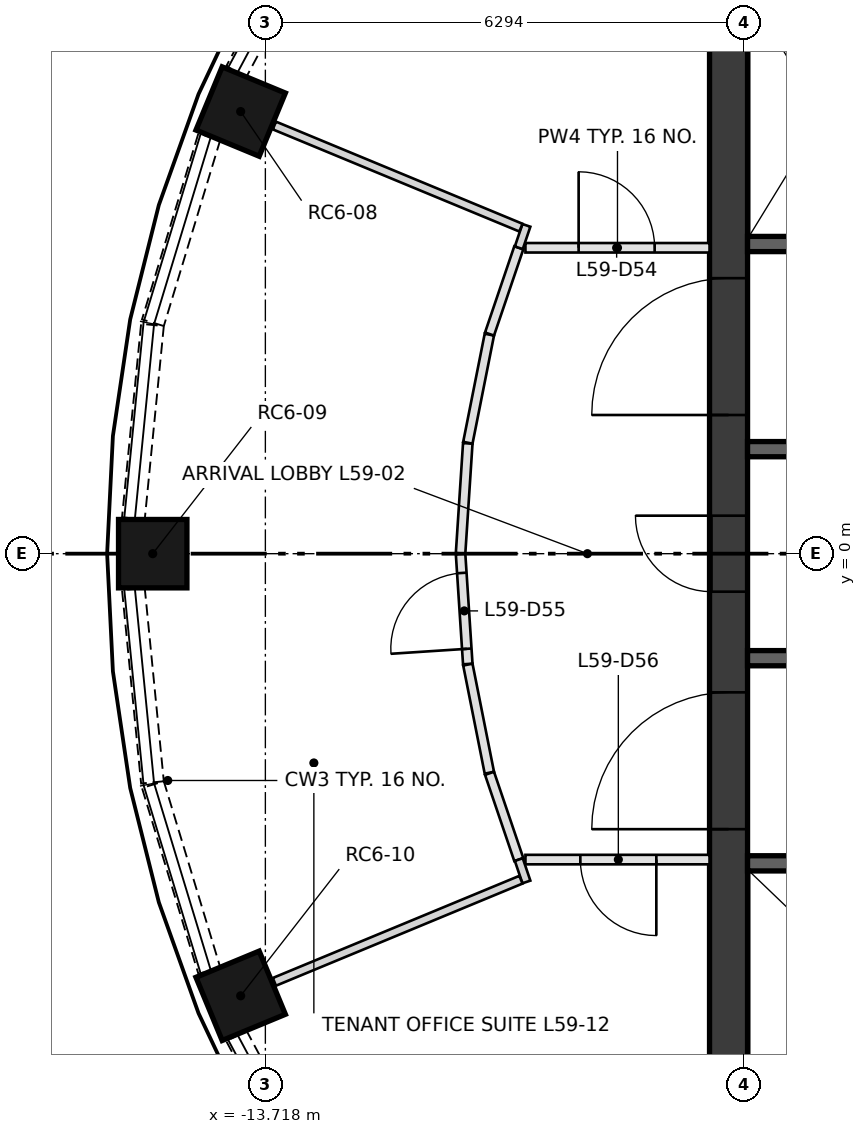
"""IFC4 building model, lengths in metres.
Left out: names, types, materials, properties, quantities, classifications, styles, units other than length and angle.
Written with IfcOpenShell. Run it as: python <this file> out.ifc"""

import sys

from ifc_helpers import new_model, si_unit, direction, frame, frame_2d, origin, origin_2d, place, context, subcontext, project, spatial, rectangle, extrude, element, fill, save


model = new_model("IFC4")
c1 = context("Model", 3, precision=1e-05, world=origin(), true_north=direction((0.0, 1.0)))
c2 = subcontext(c1, "Body", "Model", "MODEL_VIEW")
j1 = project(units=[si_unit("LENGTHUNIT", "METRE"), si_unit("PLANEANGLEUNIT", "RADIAN")], contexts=[c1])
p1 = place(None, origin())
s1 = spatial("IfcSite", under=j1, at=p1, CompositionType="ELEMENT")
p2 = place(p1, origin())
s2 = spatial("IfcBuilding", under=s1, at=p2, CompositionType="ELEMENT")
p3 = place(p2, frame((0.0, 0.0, 217.8)))
s3 = spatial("IfcBuildingStorey", under=s2, at=p3, CompositionType="ELEMENT", Elevation=217.8)
for number, where, z_axis, x_axis in (
    (1, (-14.043, 5.817, 0.5), (0.0, 0.0, 1.0), (-0.924, 0.383, 0.0)),
    (2, (-15.2, 0.0, 0.5), (0.0, 0.0, 1.0), (-1.0, 0.0, 0.0)),
    (3, (-14.043, -5.817, 0.5), (0.0, 0.0, 1.0), (-0.924, -0.383, 0.0)),
):
    element("IfcColumn", number, at=place(p3, frame(where, z_axis=z_axis, x_axis=x_axis)), inside=s3, PredefinedType="COLUMN", context=c2, shape_type="SweptSolid", body=[
        extrude(rectangle(XDim=0.9, YDim=0.9, at=origin_2d()), origin(), (0.0, 0.0, 1.0), 2.85),
    ])
p4 = place(p3, frame((-7.624, -7.374, 0.0), z_axis=(0.0, 0.0, 1.0), x_axis=(0.0, 1.0, 0.0)))
e4 = element("IfcWall", 4, at=p4, inside=s3, PredefinedType="SHEAR", context=c2, shape_type="SweptSolid", body=[
    extrude(rectangle(XDim=14.748, YDim=0.5, at=frame_2d((7.374, 0.0))), origin(), (0.0, 0.0, 1.0), 3.35),
])
p5 = place(p4, frame((6.874, 0.0, 0.0)))
e5 = element("IfcOpeningElement", 5, at=p5, cuts=e4, PredefinedType="OPENING", context=c2, shape_type="SweptSolid", body=[
    extrude(rectangle(XDim=1.0, YDim=2.1, at=frame_2d((0.5, 1.05))), frame((0.0, 0.26, 0.0), z_axis=(0.0, -1.0, 0.0), x_axis=(1.0, 0.0, 0.0)), (0.0, 0.0, 1.0), 0.52),
])
p6 = place(p4, frame((3.75, 0.0, 0.0)))
e6 = element("IfcOpeningElement", 6, at=p6, cuts=e4, PredefinedType="OPENING", context=c2, shape_type="SweptSolid", body=[
    extrude(rectangle(XDim=1.8, YDim=2.1, at=frame_2d((0.9, 1.05))), frame((0.0, 0.26, 0.0), z_axis=(0.0, -1.0, 0.0), x_axis=(1.0, 0.0, 0.0)), (0.0, 0.0, 1.0), 0.52),
])
p7 = place(p4, frame((9.198, 0.0, 0.0)))
e7 = element("IfcOpeningElement", 7, at=p7, cuts=e4, PredefinedType="OPENING", context=c2, shape_type="SweptSolid", body=[
    extrude(rectangle(XDim=1.8, YDim=2.1, at=frame_2d((0.9, 1.05))), frame((0.0, 0.26, 0.0), z_axis=(0.0, -1.0, 0.0), x_axis=(1.0, 0.0, 0.0)), (0.0, 0.0, 1.0), 0.52),
])
p8 = place(p3, frame((-7.374, -4.074, 0.0), z_axis=(0.0, 0.0, 1.0), x_axis=(1.0, 0.0, 0.0)))
e8 = element("IfcWall", 8, at=p8, inside=s3, PredefinedType="SHEAR", context=c2, shape_type="SweptSolid", body=[
    extrude(rectangle(XDim=14.748, YDim=0.2, at=frame_2d((7.374, 0.0))), origin(), (0.0, 0.0, 1.0), 3.0),
])
p9 = place(p8, frame((1.319, 0.0, 0.0)))
e9 = element("IfcOpeningElement", 9, at=p9, cuts=e8, PredefinedType="OPENING", context=c2, shape_type="SweptSolid", body=[
    extrude(rectangle(XDim=1.1, YDim=2.1, at=frame_2d((0.55, 1.05))), frame((0.0, 0.11, 0.0), z_axis=(0.0, -1.0, 0.0), x_axis=(1.0, 0.0, 0.0)), (0.0, 0.0, 1.0), 0.22),
])
p10 = place(p8, frame((4.456, 0.0, 0.0)))
e10 = element("IfcOpeningElement", 10, at=p10, cuts=e8, PredefinedType="OPENING", context=c2, shape_type="SweptSolid", body=[
    extrude(rectangle(XDim=1.1, YDim=2.1, at=frame_2d((0.55, 1.05))), frame((0.0, 0.11, 0.0), z_axis=(0.0, -1.0, 0.0), x_axis=(1.0, 0.0, 0.0)), (0.0, 0.0, 1.0), 0.22),
])
p11 = place(p8, frame((8.143, 0.0, 0.0)))
e11 = element("IfcOpeningElement", 11, at=p11, cuts=e8, PredefinedType="OPENING", context=c2, shape_type="SweptSolid", body=[
    extrude(rectangle(XDim=1.0, YDim=2.1, at=frame_2d((0.5, 1.05))), frame((0.0, 0.11, 0.0), z_axis=(0.0, -1.0, 0.0), x_axis=(1.0, 0.0, 0.0)), (0.0, 0.0, 1.0), 0.22),
])
p12 = place(p8, frame((12.379, 0.0, 0.0)))
e12 = element("IfcOpeningElement", 12, at=p12, cuts=e8, PredefinedType="OPENING", context=c2, shape_type="SweptSolid", body=[
    extrude(rectangle(XDim=0.8, YDim=2.1, at=frame_2d((0.4, 1.05))), frame((0.0, 0.11, 0.0), z_axis=(0.0, -1.0, 0.0), x_axis=(1.0, 0.0, 0.0)), (0.0, 0.0, 1.0), 0.22),
])
p13 = place(p3, frame((-7.374, 4.074, 0.0), z_axis=(0.0, 0.0, 1.0), x_axis=(1.0, 0.0, 0.0)))
e13 = element("IfcWall", 13, at=p13, inside=s3, PredefinedType="SHEAR", context=c2, shape_type="SweptSolid", body=[
    extrude(rectangle(XDim=7.374, YDim=0.2, at=frame_2d((3.687, 0.0))), origin(), (0.0, 0.0, 1.0), 3.0),
])
p14 = place(p13, frame((0.684, 0.0, 0.0)))
e14 = element("IfcOpeningElement", 14, at=p14, cuts=e13, PredefinedType="OPENING", context=c2, shape_type="SweptSolid", body=[
    extrude(rectangle(XDim=1.0, YDim=2.1, at=frame_2d((0.5, 1.05))), frame((0.0, 0.11, 0.0), z_axis=(0.0, -1.0, 0.0), x_axis=(1.0, 0.0, 0.0)), (0.0, 0.0, 1.0), 0.22),
])
p15 = place(p13, frame((2.453, 0.0, 0.0)))
e15 = element("IfcOpeningElement", 15, at=p15, cuts=e13, PredefinedType="OPENING", context=c2, shape_type="SweptSolid", body=[
    extrude(rectangle(XDim=1.0, YDim=2.1, at=frame_2d((0.5, 1.05))), frame((0.0, 0.11, 0.0), z_axis=(0.0, -1.0, 0.0), x_axis=(1.0, 0.0, 0.0)), (0.0, 0.0, 1.0), 0.22),
])
p16 = place(p13, frame((4.221, 0.0, 0.0)))
e16 = element("IfcOpeningElement", 16, at=p16, cuts=e13, PredefinedType="OPENING", context=c2, shape_type="SweptSolid", body=[
    extrude(rectangle(XDim=1.0, YDim=2.1, at=frame_2d((0.5, 1.05))), frame((0.0, 0.11, 0.0), z_axis=(0.0, -1.0, 0.0), x_axis=(1.0, 0.0, 0.0)), (0.0, 0.0, 1.0), 0.22),
])
p17 = place(p13, frame((5.99, 0.0, 0.0)))
e17 = element("IfcOpeningElement", 17, at=p17, cuts=e13, PredefinedType="OPENING", context=c2, shape_type="SweptSolid", body=[
    extrude(rectangle(XDim=1.0, YDim=2.1, at=frame_2d((0.5, 1.05))), frame((0.0, 0.11, 0.0), z_axis=(0.0, -1.0, 0.0), x_axis=(1.0, 0.0, 0.0)), (0.0, 0.0, 1.0), 0.22),
])
for number, where, z_axis, x_axis in (
    (18, (-7.374, -1.375, 0.0), (0.0, 0.0, 1.0), (1.0, 0.0, 0.0)),
    (19, (-7.374, 1.375, 0.0), (0.0, 0.0, 1.0), (1.0, 0.0, 0.0)),
):
    element("IfcWall", number, at=place(p3, frame(where, z_axis=z_axis, x_axis=x_axis)), inside=s3, PredefinedType="SHEAR", context=c2, shape_type="SweptSolid", body=[
        extrude(rectangle(XDim=3.0, YDim=0.2, at=frame_2d((1.5, 0.0))), origin(), (0.0, 0.0, 1.0), 3.0),
    ])
p18 = place(p3, frame((-12.894, 8.598, 0.0), z_axis=(0.0, 0.0, 1.0), x_axis=(-0.471603904468, -0.881810499649, 0.0)))
e20 = element("IfcWall", 20, at=p18, inside=s3, PredefinedType="SOLIDWALL", context=c2, shape_type="SweptSolid", body=[
    extrude(rectangle(XDim=2.557, YDim=0.3, at=frame_2d((1.278, 0.0))), origin(), (0.0, 0.0, 1.0), 0.9),
])
p19 = place(p3, frame((-14.455, 5.486, 0.0), z_axis=(0.0, 0.0, 1.0), x_axis=(-0.290219358397, -0.956960147557, 0.0)))
e21 = element("IfcWall", 21, at=p19, inside=s3, PredefinedType="SOLIDWALL", context=c2, shape_type="SweptSolid", body=[
    extrude(rectangle(XDim=2.557, YDim=0.3, at=frame_2d((1.279, 0.0))), origin(), (0.0, 0.0, 1.0), 0.9),
])
for number, where, z_axis, x_axis in (
    (22, (-15.204, 3.009, 0.0), (0.0, 0.0, 1.0), (-0.098, -0.995, 0.0)),
    (23, (-15.455, -0.464, 0.0), (0.0, 0.0, 1.0), (0.098, -0.995, 0.0)),
):
    element("IfcWall", number, at=place(p3, frame(where, z_axis=z_axis, x_axis=x_axis)), inside=s3, PredefinedType="SOLIDWALL", context=c2, shape_type="SweptSolid", body=[
        extrude(rectangle(XDim=2.558, YDim=0.3, at=frame_2d((1.279, 0.0))), origin(), (0.0, 0.0, 1.0), 0.9),
    ])
p20 = place(p3, frame((-15.198, -3.038, 0.0), z_axis=(0.0, 0.0, 1.0), x_axis=(0.290219358397, -0.956960147557, 0.0)))
e24 = element("IfcWall", 24, at=p20, inside=s3, PredefinedType="SOLIDWALL", context=c2, shape_type="SweptSolid", body=[
    extrude(rectangle(XDim=2.557, YDim=0.3, at=frame_2d((1.279, 0.0))), origin(), (0.0, 0.0, 1.0), 0.9),
])
p21 = place(p3, frame((-14.1, -6.343, 0.0), z_axis=(0.0, 0.0, 1.0), x_axis=(0.471603904468, -0.881810499649, 0.0)))
e25 = element("IfcWall", 25, at=p21, inside=s3, PredefinedType="SOLIDWALL", context=c2, shape_type="SweptSolid", body=[
    extrude(rectangle(XDim=2.557, YDim=0.3, at=frame_2d((1.278, 0.0))), origin(), (0.0, 0.0, 1.0), 0.9),
])
p22 = place(p3, frame((-10.296, 4.024, 0.0), z_axis=(0.0, 0.0, 1.0), x_axis=(1.0, 0.0, 0.0)))
e26 = element("IfcWall", 26, at=p22, inside=s3, PredefinedType="PARTITIONING", context=c2, shape_type="SweptSolid", body=[
    extrude(rectangle(XDim=2.422, YDim=0.125, at=frame_2d((1.211, 0.0))), origin(), (0.0, 0.0, 1.0), 3.0),
])
p23 = place(p22, frame((0.7, 0.0, 0.0)))
e27 = element("IfcOpeningElement", 27, at=p23, cuts=e26, PredefinedType="OPENING", context=c2, shape_type="SweptSolid", body=[
    extrude(rectangle(XDim=1.0, YDim=2.1, at=frame_2d((0.5, 1.05))), frame((0.0, 0.073, 0.0), z_axis=(0.0, -1.0, 0.0), x_axis=(1.0, 0.0, 0.0)), (0.0, 0.0, 1.0), 0.145),
])
p24 = place(p3, frame((-11.15, 0.004, 0.0), z_axis=(0.0, 0.0, 1.0), x_axis=(0.065312343013, 0.997864869534, 0.0)))
e28 = element("IfcWall", 28, at=p24, inside=s3, PredefinedType="PARTITIONING", context=c2, shape_type="SweptSolid", body=[
    extrude(rectangle(XDim=1.45, YDim=0.125, at=frame_2d((0.725, 0.0))), origin(), (0.0, 0.0, 1.0), 3.0),
])
p25 = place(p3, frame((-11.055, -1.451, 0.0), z_axis=(0.0, 0.0, 1.0), x_axis=(-0.065312343013, 0.997864869534, 0.0)))
e29 = element("IfcWall", 29, at=p25, inside=s3, PredefinedType="PARTITIONING", context=c2, shape_type="SweptSolid", body=[
    extrude(rectangle(XDim=1.45, YDim=0.125, at=frame_2d((0.725, 0.0))), origin(), (0.0, 0.0, 1.0), 3.0),
])
p26 = place(p25, frame((0.2, 0.0, 0.0)))
e30 = element("IfcOpeningElement", 30, at=p26, cuts=e29, PredefinedType="OPENING", context=c2, shape_type="SweptSolid", body=[
    extrude(rectangle(XDim=1.0, YDim=2.1, at=frame_2d((0.5, 1.05))), frame((0.0, 0.073, 0.0), z_axis=(0.0, -1.0, 0.0), x_axis=(1.0, 0.0, 0.0)), (0.0, 0.0, 1.0), 0.145),
])
for number, where, z_axis, x_axis in (
    (31, (-11.054, 1.459, 0.0), (0.0, 0.0, 1.0), (0.195, 0.981, 0.0)),
    (32, (-10.771, -2.882, 0.0), (0.0, 0.0, 1.0), (-0.195, 0.981, 0.0)),
):
    element("IfcWall", number, at=place(p3, frame(where, z_axis=z_axis, x_axis=x_axis)), inside=s3, PredefinedType="PARTITIONING", context=c2, shape_type="SweptSolid", body=[
        extrude(rectangle(XDim=1.45, YDim=0.125, at=frame_2d((0.725, 0.0))), origin(), (0.0, 0.0, 1.0), 3.0),
    ])
for number, where, z_axis, x_axis in (
    (33, (-10.769, 2.89, 0.0), (0.0, 0.0, 1.0), (0.321, 0.947, 0.0)),
    (34, (-10.384, -4.024, 0.0), (0.0, 0.0, 1.0), (-0.321, 0.947, 0.0)),
):
    element("IfcWall", number, at=place(p3, frame(where, z_axis=z_axis, x_axis=x_axis)), inside=s3, PredefinedType="PARTITIONING", context=c2, shape_type="SweptSolid", body=[
        extrude(rectangle(XDim=1.198, YDim=0.125, at=frame_2d((0.599, 0.0))), origin(), (0.0, 0.0, 1.0), 3.0),
    ])
p27 = place(p3, frame((-7.874, -4.024, 0.0), z_axis=(0.0, 0.0, 1.0), x_axis=(-1.0, 0.0, 0.0)))
e35 = element("IfcWall", 35, at=p27, inside=s3, PredefinedType="PARTITIONING", context=c2, shape_type="SweptSolid", body=[
    extrude(rectangle(XDim=2.422, YDim=0.125, at=frame_2d((1.211, 0.0))), origin(), (0.0, 0.0, 1.0), 3.0),
])
p28 = place(p27, frame((0.7, 0.0, 0.0)))
e36 = element("IfcOpeningElement", 36, at=p28, cuts=e35, PredefinedType="OPENING", context=c2, shape_type="SweptSolid", body=[
    extrude(rectangle(XDim=1.0, YDim=2.1, at=frame_2d((0.5, 1.05))), frame((0.0, 0.073, 0.0), z_axis=(0.0, -1.0, 0.0), x_axis=(1.0, 0.0, 0.0)), (0.0, 0.0, 1.0), 0.145),
])
p29 = place(p3, frame((-10.384, 4.024, 0.0), z_axis=(0.0, 0.0, 1.0), x_axis=(0.320931919594, 0.947102266382, 0.0)))
e37 = element("IfcWall", 37, at=p29, inside=s3, PredefinedType="PARTITIONING", context=c2, shape_type="SweptSolid", body=[
    extrude(rectangle(XDim=0.311, YDim=0.11, at=frame_2d((0.156, 0.0))), origin(), (0.0, 0.0, 1.0), 3.0),
])
p30 = place(p3, frame((-10.356, 4.289, 0.0), z_axis=(0.0, 0.0, 1.0), x_axis=(-0.923871065891, 0.382703871955, 0.0)))
e38 = element("IfcWall", 38, at=p30, inside=s3, PredefinedType="PARTITIONING", context=c2, shape_type="SweptSolid", body=[
    extrude(rectangle(XDim=3.511, YDim=0.11, at=frame_2d((1.756, 0.0))), origin(), (0.0, 0.0, 1.0), 3.0),
])
p31 = place(p3, frame((-10.384, -4.024, 0.0), z_axis=(0.0, 0.0, 1.0), x_axis=(0.320931919594, -0.947102266382, 0.0)))
e39 = element("IfcWall", 39, at=p31, inside=s3, PredefinedType="PARTITIONING", context=c2, shape_type="SweptSolid", body=[
    extrude(rectangle(XDim=0.311, YDim=0.11, at=frame_2d((0.156, 0.0))), origin(), (0.0, 0.0, 1.0), 3.0),
])
p32 = place(p3, frame((-10.356, -4.289, 0.0), z_axis=(0.0, 0.0, 1.0), x_axis=(-0.923871065891, -0.382703871955, 0.0)))
e40 = element("IfcWall", 40, at=p32, inside=s3, PredefinedType="PARTITIONING", context=c2, shape_type="SweptSolid", body=[
    extrude(rectangle(XDim=3.511, YDim=0.11, at=frame_2d((1.756, 0.0))), origin(), (0.0, 0.0, 1.0), 3.0),
])
p33 = place(p5, origin())
e41 = element("IfcDoor", 41, at=p33, inside=s3, OperationType="SINGLE_SWING_RIGHT", PredefinedType="DOOR", context=c2, shape_type="SweptSolid", body=[
    extrude(rectangle(XDim=1.0, YDim=2.1, at=frame_2d((0.5, 1.05))), frame((0.0, 0.25, 0.0), z_axis=(0.0, -1.0, 0.0), x_axis=(1.0, 0.0, 0.0)), (0.0, 0.0, 1.0), 0.05),
])
fill(e5, e41)
p34 = place(p6, origin())
e42 = element("IfcDoor", 42, at=p34, inside=s3, OperationType="DOUBLE_DOOR_SINGLE_SWING", PredefinedType="DOOR", context=c2, shape_type="SweptSolid", body=[
    extrude(rectangle(XDim=1.8, YDim=2.1, at=frame_2d((0.9, 1.05))), frame((0.0, 0.025, 0.0), z_axis=(0.0, -1.0, 0.0), x_axis=(1.0, 0.0, 0.0)), (0.0, 0.0, 1.0), 0.05),
])
fill(e6, e42)
p35 = place(p7, origin())
e43 = element("IfcDoor", 43, at=p35, inside=s3, OperationType="DOUBLE_DOOR_SINGLE_SWING", PredefinedType="DOOR", context=c2, shape_type="SweptSolid", body=[
    extrude(rectangle(XDim=1.8, YDim=2.1, at=frame_2d((0.9, 1.05))), frame((0.0, 0.025, 0.0), z_axis=(0.0, -1.0, 0.0), x_axis=(1.0, 0.0, 0.0)), (0.0, 0.0, 1.0), 0.05),
])
fill(e7, e43)
p36 = place(p23, origin())
e44 = element("IfcDoor", 44, at=p36, inside=s3, OperationType="SINGLE_SWING_LEFT", PredefinedType="DOOR", context=c2, shape_type="SweptSolid", body=[
    extrude(rectangle(XDim=1.0, YDim=2.1, at=frame_2d((0.5, 1.05))), frame((0.0, 0.025, 0.0), z_axis=(0.0, -1.0, 0.0), x_axis=(1.0, 0.0, 0.0)), (0.0, 0.0, 1.0), 0.05),
])
fill(e27, e44)
p37 = place(p26, origin())
e45 = element("IfcDoor", 45, at=p37, inside=s3, OperationType="SINGLE_SWING_LEFT", PredefinedType="DOOR", context=c2, shape_type="SweptSolid", body=[
    extrude(rectangle(XDim=1.0, YDim=2.1, at=frame_2d((0.5, 1.05))), frame((0.0, 0.025, 0.0), z_axis=(0.0, -1.0, 0.0), x_axis=(1.0, 0.0, 0.0)), (0.0, 0.0, 1.0), 0.05),
])
fill(e30, e45)
p38 = place(p28, origin())
e46 = element("IfcDoor", 46, at=p38, inside=s3, OperationType="SINGLE_SWING_LEFT", PredefinedType="DOOR", context=c2, shape_type="SweptSolid", body=[
    extrude(rectangle(XDim=1.0, YDim=2.1, at=frame_2d((0.5, 1.05))), frame((0.0, 0.025, 0.0), z_axis=(0.0, -1.0, 0.0), x_axis=(1.0, 0.0, 0.0)), (0.0, 0.0, 1.0), 0.05),
])
fill(e36, e46)
save(model, sys.argv[1])
